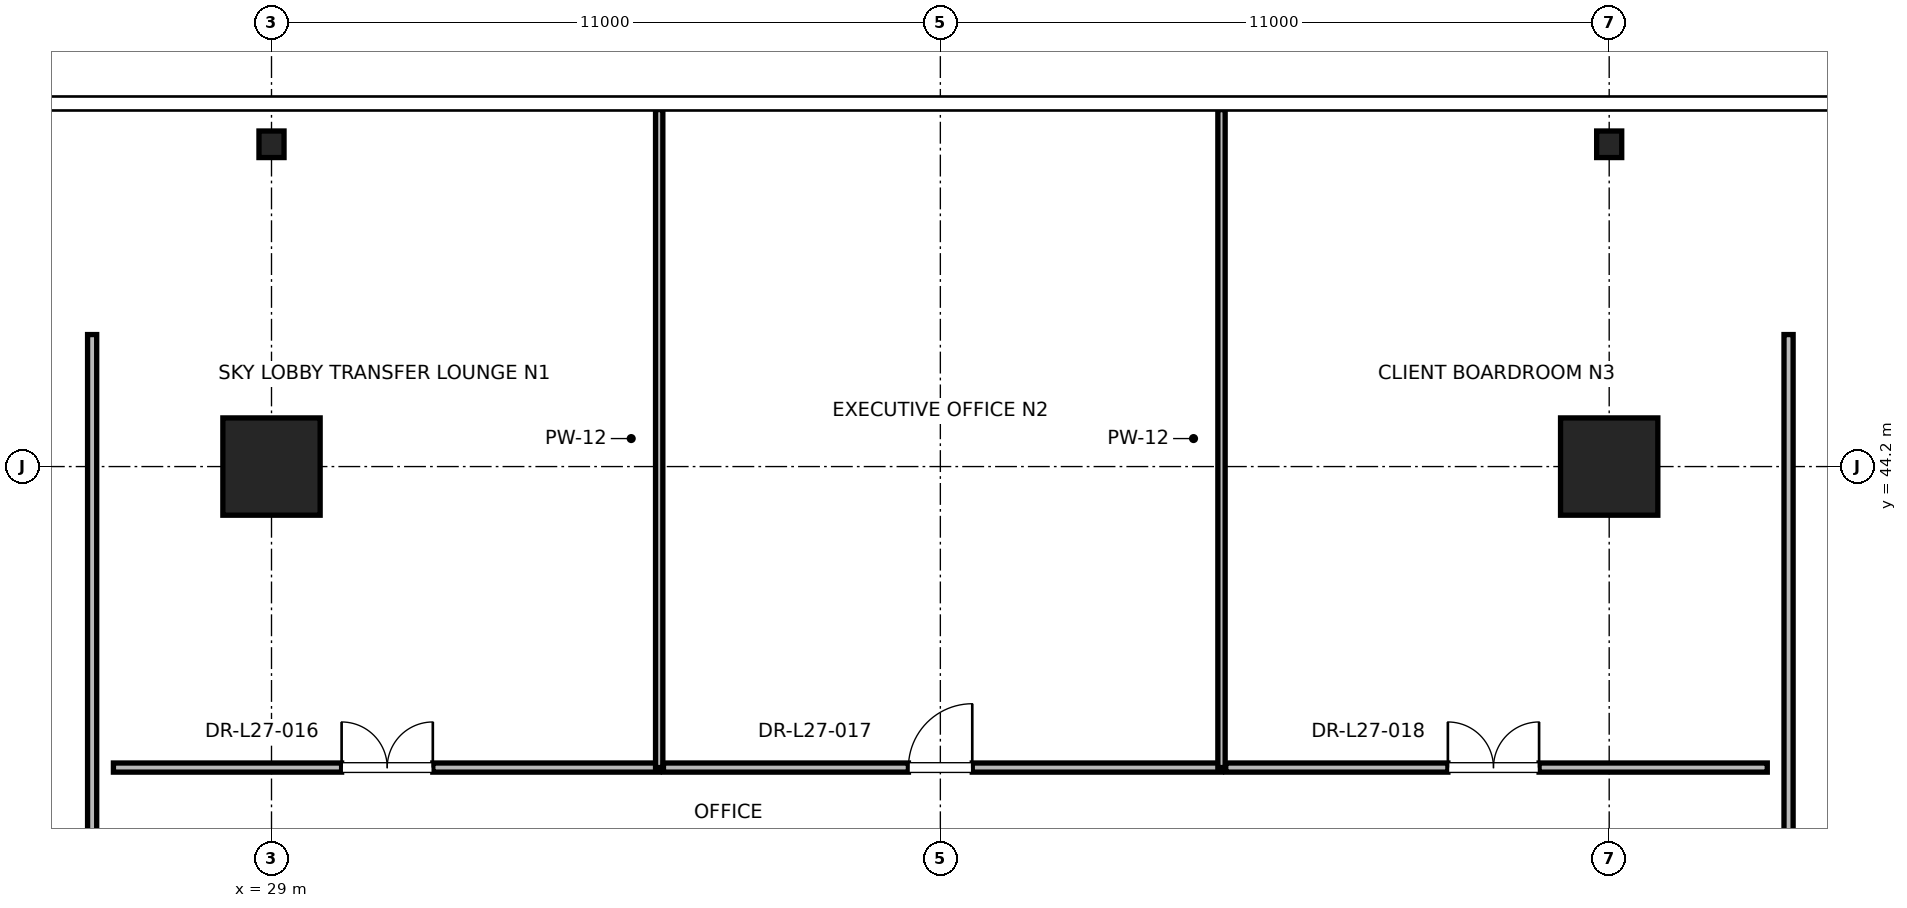
"""IFC4 building model, lengths in metres.
Left out: names, types, materials, properties, quantities, classifications, styles, units other than length and angle.
Written with IfcOpenShell. Run it as: python <this file> out.ifc"""

import sys

from ifc_helpers import new_model, si_unit, direction, frame, frame_2d, origin, origin_2d, place, context, subcontext, project, spatial, rectangle, i_section, extrude, element, fill, save


model = new_model("IFC4")
c1 = context("Model", 3, precision=1e-05, world=origin(), true_north=direction((0.0, 1.0)))
c2 = subcontext(c1, "Body", "Model", "MODEL_VIEW")
j1 = project(units=[si_unit("LENGTHUNIT", "METRE"), si_unit("PLANEANGLEUNIT", "RADIAN")], contexts=[c1])
p1 = place(None, origin())
s1 = spatial("IfcSite", under=j1, at=p1, CompositionType="ELEMENT")
p2 = place(p1, origin())
s2 = spatial("IfcBuilding", under=s1, at=p2, CompositionType="ELEMENT")
p3 = place(p2, frame((0.0, 0.0, 118.4)))
s3 = spatial("IfcBuildingStorey", under=s2, at=p3, CompositionType="ELEMENT", Elevation=118.4)
for number, where, z_axis, x_axis in (
    (1, (29.0, 44.2, 0.0), (0.0, 0.0, 1.0), (1.0, 0.0, 0.0)),
    (2, (51.0, 44.2, 0.0), (0.0, 0.0, 1.0), (1.0, 0.0, 0.0)),
):
    element("IfcColumn", number, at=place(p3, frame(where, z_axis=z_axis, x_axis=x_axis)), inside=s3, PredefinedType="COLUMN", context=c2, shape_type="SweptSolid", body=[
        extrude(rectangle(XDim=1.6, YDim=1.6, at=origin_2d()), origin(), (0.0, 0.0, 1.0), 5.0),
    ])
for number, where, z_axis, x_axis in (
    (3, (29.0, 49.5, 0.0), (0.0, 0.0, 1.0), (1.0, 0.0, 0.0)),
    (4, (51.0, 49.5, 0.0), (0.0, 0.0, 1.0), (1.0, 0.0, 0.0)),
):
    element("IfcColumn", number, at=place(p3, frame(where, z_axis=z_axis, x_axis=x_axis)), inside=s3, PredefinedType="COLUMN", context=c2, shape_type="SweptSolid", body=[
        extrude(i_section(OverallWidth=0.412, OverallDepth=0.437, WebThickness=0.036, FlangeThickness=0.058, FilletRadius=0.015, at=origin_2d()), origin(), (0.0, 0.0, 1.0), 5.0),
    ])
p4 = place(p3, frame((26.4, 39.25, 0.0), z_axis=(0.0, 0.0, 1.0), x_axis=(1.0, 0.0, 0.0)))
e5 = element("IfcWall", 5, at=p4, inside=s3, PredefinedType="PARTITIONING", context=c2, shape_type="SweptSolid", body=[
    extrude(rectangle(XDim=8.976, YDim=0.15, at=frame_2d((4.488, 0.0))), origin(), (0.0, 0.0, 1.0), 2.85),
])
p5 = place(p4, frame((3.753, 0.0, 0.0)))
e6 = element("IfcOpeningElement", 6, at=p5, cuts=e5, PredefinedType="OPENING", context=c2, shape_type="SweptSolid", body=[
    extrude(rectangle(XDim=1.5, YDim=2.25, at=frame_2d((0.75, 1.125))), frame((0.0, 0.075, 0.0), z_axis=(0.0, -1.0, 0.0), x_axis=(1.0, 0.0, 0.0)), (0.0, 0.0, 1.0), 0.15),
])
p6 = place(p3, frame((35.376, 39.25, 0.0), z_axis=(0.0, 0.0, 1.0), x_axis=(0.0, 1.0, 0.0)))
e7 = element("IfcWall", 7, at=p6, inside=s3, PredefinedType="PARTITIONING", context=c2, shape_type="SweptSolid", body=[
    extrude(rectangle(XDim=10.821, YDim=0.12, at=frame_2d((5.41, 0.0))), origin(), (0.0, 0.0, 1.0), 2.85),
])
p7 = place(p3, frame((35.446, 39.25, 0.0), z_axis=(0.0, 0.0, 1.0), x_axis=(1.0, 0.0, 0.0)))
e8 = element("IfcWall", 8, at=p7, inside=s3, PredefinedType="PARTITIONING", context=c2, shape_type="SweptSolid", body=[
    extrude(rectangle(XDim=9.178, YDim=0.15, at=frame_2d((4.589, 0.0))), origin(), (0.0, 0.0, 1.0), 2.85),
])
p8 = place(p7, frame((4.029, 0.0, 0.0)))
e9 = element("IfcOpeningElement", 9, at=p8, cuts=e8, PredefinedType="OPENING", context=c2, shape_type="SweptSolid", body=[
    extrude(rectangle(XDim=1.05, YDim=2.2, at=frame_2d((0.525, 1.1))), frame((0.0, 0.075, 0.0), z_axis=(0.0, -1.0, 0.0), x_axis=(1.0, 0.0, 0.0)), (0.0, 0.0, 1.0), 0.15),
])
p9 = place(p3, frame((44.624, 39.25, 0.0), z_axis=(0.0, 0.0, 1.0), x_axis=(0.0, 1.0, 0.0)))
e10 = element("IfcWall", 10, at=p9, inside=s3, PredefinedType="PARTITIONING", context=c2, shape_type="SweptSolid", body=[
    extrude(rectangle(XDim=10.821, YDim=0.12, at=frame_2d((5.41, 0.0))), origin(), (0.0, 0.0, 1.0), 2.85),
])
p10 = place(p3, frame((44.694, 39.25, 0.0), z_axis=(0.0, 0.0, 1.0), x_axis=(1.0, 0.0, 0.0)))
e11 = element("IfcWall", 11, at=p10, inside=s3, PredefinedType="PARTITIONING", context=c2, shape_type="SweptSolid", body=[
    extrude(rectangle(XDim=8.906, YDim=0.15, at=frame_2d((4.453, 0.0))), origin(), (0.0, 0.0, 1.0), 2.85),
])
p11 = place(p10, frame((3.653, 0.0, 0.0)))
e12 = element("IfcOpeningElement", 12, at=p11, cuts=e11, PredefinedType="OPENING", context=c2, shape_type="SweptSolid", body=[
    extrude(rectangle(XDim=1.5, YDim=2.25, at=frame_2d((0.75, 1.125))), frame((0.0, 0.075, 0.0), z_axis=(0.0, -1.0, 0.0), x_axis=(1.0, 0.0, 0.0)), (0.0, 0.0, 1.0), 0.15),
])
p12 = place(p3, frame((26.05, 34.364, 0.0), z_axis=(0.0, 0.0, 1.0), x_axis=(0.0, 1.0, 0.0)))
e13 = element("IfcWall", 13, at=p12, inside=s3, PredefinedType="PARTITIONING", context=c2, shape_type="SweptSolid", body=[
    extrude(rectangle(XDim=12.007, YDim=0.15, at=frame_2d((6.004, 0.0))), origin(), (0.0, 0.0, 1.0), 2.85),
])
p13 = place(p12, frame((0.268, 0.0, 0.0)))
e14 = element("IfcOpeningElement", 14, at=p13, cuts=e13, PredefinedType="OPENING", context=c2, shape_type="SweptSolid", body=[
    extrude(rectangle(XDim=1.5, YDim=2.25, at=frame_2d((0.75, 1.125))), frame((0.0, 0.075, 0.0), z_axis=(0.0, -1.0, 0.0), x_axis=(1.0, 0.0, 0.0)), (0.0, 0.0, 1.0), 0.15),
])
p14 = place(p3, frame((53.95, 24.551, 0.0), z_axis=(0.0, 0.0, 1.0), x_axis=(0.0, 1.0, 0.0)))
e15 = element("IfcWall", 15, at=p14, inside=s3, PredefinedType="PARTITIONING", context=c2, shape_type="SweptSolid", body=[
    extrude(rectangle(XDim=21.82, YDim=0.15, at=frame_2d((10.91, 0.0))), origin(), (0.0, 0.0, 1.0), 2.85),
])
p15 = place(p14, frame((5.425, 0.0, 0.0)))
e16 = element("IfcOpeningElement", 16, at=p15, cuts=e15, PredefinedType="OPENING", context=c2, shape_type="SweptSolid", body=[
    extrude(rectangle(XDim=1.0, YDim=2.15, at=frame_2d((0.5, 1.075))), frame((0.0, 0.075, 0.0), z_axis=(0.0, -1.0, 0.0), x_axis=(1.0, 0.0, 0.0)), (0.0, 0.0, 1.0), 0.15),
])
p16 = place(p5, origin())
e17 = element("IfcDoor", 17, at=p16, inside=s3, OperationType="DOUBLE_DOOR_SINGLE_SWING", PredefinedType="DOOR", context=c2, shape_type="SweptSolid", body=[
    extrude(rectangle(XDim=1.5, YDim=2.25, at=frame_2d((0.75, 1.125))), frame((0.0, 0.025, 0.0), z_axis=(0.0, -1.0, 0.0), x_axis=(1.0, 0.0, 0.0)), (0.0, 0.0, 1.0), 0.05),
])
fill(e6, e17)
p17 = place(p8, origin())
e18 = element("IfcDoor", 18, at=p17, inside=s3, OperationType="SINGLE_SWING_RIGHT", PredefinedType="DOOR", context=c2, shape_type="SweptSolid", body=[
    extrude(rectangle(XDim=1.05, YDim=2.2, at=frame_2d((0.525, 1.1))), frame((0.0, 0.025, 0.0), z_axis=(0.0, -1.0, 0.0), x_axis=(1.0, 0.0, 0.0)), (0.0, 0.0, 1.0), 0.05),
])
fill(e9, e18)
p18 = place(p11, origin())
e19 = element("IfcDoor", 19, at=p18, inside=s3, OperationType="DOUBLE_DOOR_SINGLE_SWING", PredefinedType="DOOR", context=c2, shape_type="SweptSolid", body=[
    extrude(rectangle(XDim=1.5, YDim=2.25, at=frame_2d((0.75, 1.125))), frame((0.0, 0.025, 0.0), z_axis=(0.0, -1.0, 0.0), x_axis=(1.0, 0.0, 0.0)), (0.0, 0.0, 1.0), 0.05),
])
fill(e12, e19)
save(model, sys.argv[1])
